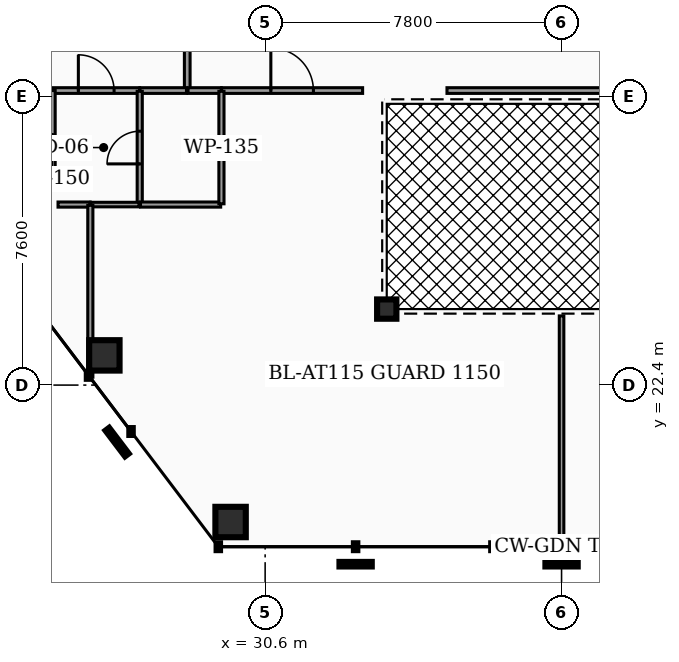
"""IFC4 building model, lengths in metres.
Left out: names, types, materials, properties, quantities, classifications, styles, units other than length and angle.
Written with IfcOpenShell. Run it as: python <this file> out.ifc"""

import sys

from ifc_helpers import new_model, si_unit, direction, frame, frame_2d, origin, origin_2d, place, context, subcontext, project, spatial, rectangle, hollow_rectangle, hollow_circle, extrude, element, fill, save


model = new_model("IFC4")
c1 = context("Model", 3, precision=1e-05, world=origin(), true_north=direction((0.0, 1.0)))
c2 = subcontext(c1, "Body", "Model", "MODEL_VIEW")
j1 = project(units=[si_unit("LENGTHUNIT", "METRE"), si_unit("PLANEANGLEUNIT", "RADIAN")], contexts=[c1])
p1 = place(None, origin())
s1 = spatial("IfcSite", under=j1, at=p1, CompositionType="ELEMENT")
p2 = place(p1, origin())
s2 = spatial("IfcBuilding", under=s1, at=p2, CompositionType="ELEMENT")
p3 = place(p2, frame((0.0, 0.0, 114.58)))
s3 = spatial("IfcBuildingStorey", under=s2, at=p3, CompositionType="ELEMENT", Elevation=114.58)
for number, where, z_axis, x_axis in (
    (1, (26.369, 23.182, 0.0), (0.0, 0.0, 1.0), (1.0, 0.0, 0.0)),
    (2, (29.691, 18.797, 0.0), (0.0, 0.0, 1.0), (1.0, 0.0, 0.0)),
):
    element("IfcColumn", number, at=place(p3, frame(where, z_axis=z_axis, x_axis=x_axis)), inside=s3, PredefinedType="COLUMN", context=c2, shape_type="SweptSolid", body=[
        extrude(hollow_rectangle(XDim=0.8, YDim=0.8, WallThickness=0.04, at=origin_2d()), origin(), (0.0, 0.0, 1.0), 4.12),
    ])
p4 = place(p3, frame((33.8, 24.4, 0.0), z_axis=(0.0, 0.0, 1.0), x_axis=(1.0, 0.0, 0.0)))
e3 = element("IfcColumn", 3, at=p4, inside=s3, PredefinedType="COLUMN", context=c2, shape_type="SweptSolid", body=[
    extrude(hollow_circle(Radius=0.254, WallThickness=0.02, at=origin_2d()), origin(), (0.0, 0.0, 1.0), 4.12),
])
p5 = place(p3, frame((28.55, 30.17, 0.0), z_axis=(0.0, 0.0, 1.0), x_axis=(0.0, 1.0, 0.0)))
e4 = element("IfcWall", 4, at=p5, inside=s3, PredefinedType="PARTITIONING", context=c2, shape_type="SweptSolid", body=[
    extrude(rectangle(XDim=3.065, YDim=0.15, at=frame_2d((1.533, 0.0))), origin(), (0.0, 0.0, 1.0), 3.077),
])
p6 = place(p5, frame((1.062, 0.0, 0.0)))
e5 = element("IfcOpeningElement", 5, at=p6, cuts=e4, PredefinedType="OPENING", context=c2, shape_type="SweptSolid", body=[
    extrude(rectangle(XDim=0.94, YDim=2.05, at=frame_2d((0.47, 1.025))), frame((0.0, 0.085, 0.0), z_axis=(0.0, -1.0, 0.0), x_axis=(1.0, 0.0, 0.0)), (0.0, 0.0, 1.0), 0.17),
])
p7 = place(p3, frame((28.57, 30.15, 0.0), z_axis=(0.0, 0.0, 1.0), x_axis=(1.0, 0.0, 0.0)))
e6 = element("IfcWall", 6, at=p7, inside=s3, PredefinedType="PARTITIONING", context=c2, shape_type="SweptSolid", body=[
    extrude(rectangle(XDim=0.875, YDim=0.15, at=frame_2d((0.438, 0.0))), origin(), (0.0, 0.0, 1.0), 3.077),
])
p8 = place(p3, frame((29.455, 30.15, 0.0), z_axis=(0.0, 0.0, 1.0), x_axis=(1.0, 0.0, 0.0)))
e7 = element("IfcWall", 7, at=p8, inside=s3, PredefinedType="PARTITIONING", context=c2, shape_type="SweptSolid", body=[
    extrude(rectangle(XDim=3.71, YDim=0.15, at=frame_2d((1.855, 0.0))), origin(), (0.0, 0.0, 1.0), 3.077),
])
p9 = place(p8, frame((1.295, 0.0, 0.0)))
e8 = element("IfcOpeningElement", 8, at=p9, cuts=e7, PredefinedType="OPENING", context=c2, shape_type="SweptSolid", body=[
    extrude(rectangle(XDim=1.12, YDim=2.05, at=frame_2d((0.56, 1.025))), frame((0.0, 0.085, 0.0), z_axis=(0.0, -1.0, 0.0), x_axis=(1.0, 0.0, 0.0)), (0.0, 0.0, 1.0), 0.17),
])
p10 = place(p3, frame((35.385, 30.15, 0.0), z_axis=(0.0, 0.0, 1.0), x_axis=(1.0, 0.0, 0.0)))
e9 = element("IfcWall", 9, at=p10, inside=s3, PredefinedType="PARTITIONING", context=c2, shape_type="SweptSolid", body=[
    extrude(rectangle(XDim=10.01, YDim=0.15, at=frame_2d((5.005, 0.0))), origin(), (0.0, 0.0, 1.0), 3.077),
])
p11 = place(p10, frame((7.845, 0.0, 0.0)))
e10 = element("IfcOpeningElement", 10, at=p11, cuts=e9, PredefinedType="OPENING", context=c2, shape_type="SweptSolid", body=[
    extrude(rectangle(XDim=1.12, YDim=2.05, at=frame_2d((0.56, 1.025))), frame((0.0, 0.085, 0.0), z_axis=(0.0, -1.0, 0.0), x_axis=(1.0, 0.0, 0.0)), (0.0, 0.0, 1.0), 0.17),
])
p12 = place(p3, frame((25.015, 30.15, 0.0), z_axis=(0.0, 0.0, 1.0), x_axis=(1.0, 0.0, 0.0)))
e11 = element("IfcWall", 11, at=p12, inside=s3, PredefinedType="PARTITIONING", context=c2, shape_type="SweptSolid", body=[
    extrude(rectangle(XDim=2.28, YDim=0.15, at=frame_2d((1.14, 0.0))), origin(), (0.0, 0.0, 1.0), 3.077),
])
p13 = place(p12, frame((0.67, 0.0, 0.0)))
e12 = element("IfcOpeningElement", 12, at=p13, cuts=e11, PredefinedType="OPENING", context=c2, shape_type="SweptSolid", body=[
    extrude(rectangle(XDim=0.94, YDim=2.05, at=frame_2d((0.47, 1.025))), frame((0.0, 0.085, 0.0), z_axis=(0.0, -1.0, 0.0), x_axis=(1.0, 0.0, 0.0)), (0.0, 0.0, 1.0), 0.17),
])
p14 = place(p3, frame((27.305, 30.15, 0.0), z_axis=(0.0, 0.0, 1.0), x_axis=(1.0, 0.0, 0.0)))
e13 = element("IfcWall", 13, at=p14, inside=s3, PredefinedType="PARTITIONING", context=c2, shape_type="SweptSolid", body=[
    extrude(rectangle(XDim=1.225, YDim=0.15, at=frame_2d((0.613, 0.0))), origin(), (0.0, 0.0, 1.0), 3.077),
])
p15 = place(p3, frame((25.0, 27.675, 0.0), z_axis=(0.0, 0.0, 1.0), x_axis=(0.0, 1.0, 0.0)))
e14 = element("IfcWall", 14, at=p15, inside=s3, PredefinedType="PARTITIONING", context=c2, shape_type="SweptSolid", body=[
    extrude(rectangle(XDim=2.475, YDim=0.15, at=frame_2d((1.237, 0.0))), origin(), (0.0, 0.0, 1.0), 3.077),
])
p16 = place(p3, frame((22.662, 30.741, 0.0), z_axis=(0.0, 0.0, 1.0), x_axis=(0.603806431354, -0.797130976349, 0.0)))
e15 = element("IfcWall", 15, at=p16, inside=s3, PredefinedType="PARTITIONING", context=c2, shape_type="SweptSolid", body=[
    extrude(rectangle(XDim=3.852, YDim=0.15, at=frame_2d((1.926, 0.0))), origin(), (0.0, 0.0, 1.0), 3.077),
])
p17 = place(p3, frame((27.3, 27.17, 0.0), z_axis=(0.0, 0.0, 1.0), x_axis=(0.0, 1.0, 0.0)))
e16 = element("IfcWall", 16, at=p17, inside=s3, PredefinedType="PARTITIONING", context=c2, shape_type="SweptSolid", body=[
    extrude(rectangle(XDim=2.96, YDim=0.135, at=frame_2d((1.48, 0.0))), origin(), (0.0, 0.0, 1.0), 3.077),
])
p18 = place(p17, frame((1.05, 0.0, 0.0)))
e17 = element("IfcOpeningElement", 17, at=p18, cuts=e16, PredefinedType="OPENING", context=c2, shape_type="SweptSolid", body=[
    extrude(rectangle(XDim=0.86, YDim=2.05, at=frame_2d((0.43, 1.025))), frame((0.0, 0.077, 0.0), z_axis=(0.0, -1.0, 0.0), x_axis=(1.0, 0.0, 0.0)), (0.0, 0.0, 1.0), 0.155),
])
p19 = place(p3, frame((26.005, 27.15, 0.0), z_axis=(0.0, 0.0, 1.0), x_axis=(1.0, 0.0, 0.0)))
e18 = element("IfcWall", 18, at=p19, inside=s3, PredefinedType="PARTITIONING", context=c2, shape_type="SweptSolid", body=[
    extrude(rectangle(XDim=1.275, YDim=0.12, at=frame_2d((0.638, 0.0))), origin(), (0.0, 0.0, 1.0), 3.077),
])
p20 = place(p3, frame((25.15, 27.15, 0.0), z_axis=(0.0, 0.0, 1.0), x_axis=(1.0, 0.0, 0.0)))
e19 = element("IfcWall", 19, at=p20, inside=s3, PredefinedType="PARTITIONING", context=c2, shape_type="SweptSolid", body=[
    extrude(rectangle(XDim=0.845, YDim=0.135, at=frame_2d((0.423, 0.0))), origin(), (0.0, 0.0, 1.0), 3.077),
])
p21 = place(p3, frame((27.32, 27.15, 0.0), z_axis=(0.0, 0.0, 1.0), x_axis=(1.0, 0.0, 0.0)))
e20 = element("IfcWall", 20, at=p21, inside=s3, PredefinedType="PARTITIONING", context=c2, shape_type="SweptSolid", body=[
    extrude(rectangle(XDim=2.11, YDim=0.135, at=frame_2d((1.055, 0.0))), origin(), (0.0, 0.0, 1.0), 3.077),
])
p22 = place(p3, frame((29.45, 27.17, 0.0), z_axis=(0.0, 0.0, 1.0), x_axis=(0.0, 1.0, 0.0)))
e21 = element("IfcWall", 21, at=p22, inside=s3, PredefinedType="PARTITIONING", context=c2, shape_type="SweptSolid", body=[
    extrude(rectangle(XDim=2.96, YDim=0.135, at=frame_2d((1.48, 0.0))), origin(), (0.0, 0.0, 1.0), 3.077),
])
p23 = place(p3, frame((38.4, 18.162, 0.0), z_axis=(0.0, 0.0, 1.0), x_axis=(0.0, 1.0, 0.0)))
e22 = element("IfcWall", 22, at=p23, inside=s3, PredefinedType="PARTITIONING", context=c2, shape_type="SweptSolid", body=[
    extrude(rectangle(XDim=6.058, YDim=0.12, at=frame_2d((3.029, 0.0))), origin(), (0.0, 0.0, 1.0), 3.077),
])
p24 = place(p3, frame((26.0, 22.607, 0.0), z_axis=(0.0, 0.0, 1.0), x_axis=(0.0, 1.0, 0.0)))
e23 = element("IfcWall", 23, at=p24, inside=s3, PredefinedType="PARTITIONING", context=c2, shape_type="SweptSolid", body=[
    extrude(rectangle(XDim=4.522, YDim=0.135, at=frame_2d((2.261, 0.0))), origin(), (0.0, 0.0, 1.0), 3.077),
])
p25 = place(p9, origin())
e24 = element("IfcDoor", 24, at=p25, inside=s3, OperationType="SINGLE_SWING_LEFT", PredefinedType="DOOR", context=c2, shape_type="SweptSolid", body=[
    extrude(rectangle(XDim=1.12, YDim=2.05, at=frame_2d((0.56, 1.025))), frame((0.0, 0.025, 0.0), z_axis=(0.0, -1.0, 0.0), x_axis=(1.0, 0.0, 0.0)), (0.0, 0.0, 1.0), 0.05),
])
fill(e8, e24)
p26 = place(p13, origin())
e25 = element("IfcDoor", 25, at=p26, inside=s3, OperationType="SINGLE_SWING_LEFT", PredefinedType="DOOR", context=c2, shape_type="SweptSolid", body=[
    extrude(rectangle(XDim=0.94, YDim=2.05, at=frame_2d((0.47, 1.025))), frame((0.0, 0.025, 0.0), z_axis=(0.0, -1.0, 0.0), x_axis=(1.0, 0.0, 0.0)), (0.0, 0.0, 1.0), 0.05),
])
fill(e12, e25)
p27 = place(p18, origin())
e26 = element("IfcDoor", 26, at=p27, inside=s3, OperationType="SINGLE_SWING_LEFT", PredefinedType="DOOR", context=c2, shape_type="SweptSolid", body=[
    extrude(rectangle(XDim=0.86, YDim=2.05, at=frame_2d((0.43, 1.025))), frame((0.0, 0.025, 0.0), z_axis=(0.0, -1.0, 0.0), x_axis=(1.0, 0.0, 0.0)), (0.0, 0.0, 1.0), 0.05),
])
fill(e17, e26)
save(model, sys.argv[1])
